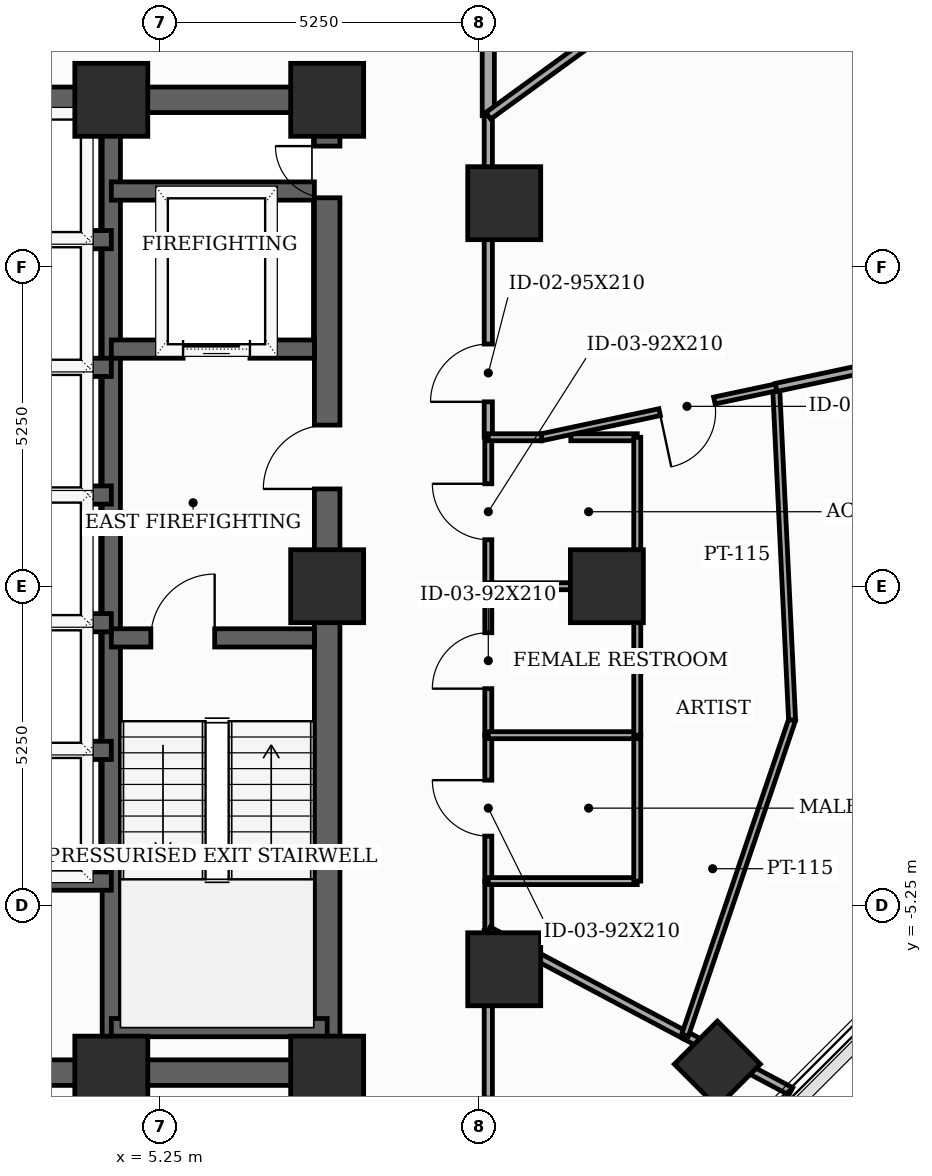
"""IFC4 building model, lengths in metres.
Left out: names, types, materials, properties, quantities, classifications, styles, units other than length and angle.
Written with IfcOpenShell. Run it as: python <this file> out.ifc"""

import sys

from ifc_helpers import new_model, si_unit, direction, frame, frame_2d, origin, origin_2d, place, context, subcontext, project, spatial, rectangle, extrude, element, fill, save


model = new_model("IFC4")
c1 = context("Model", 3, precision=1e-05, world=origin(), true_north=direction((0.0, 1.0)))
c2 = subcontext(c1, "Body", "Model", "MODEL_VIEW")
j1 = project(units=[si_unit("LENGTHUNIT", "METRE"), si_unit("PLANEANGLEUNIT", "RADIAN")], contexts=[c1])
p1 = place(None, origin())
s1 = spatial("IfcSite", under=j1, at=p1, CompositionType="ELEMENT")
p2 = place(p1, origin())
s2 = spatial("IfcBuilding", under=s1, at=p2, CompositionType="ELEMENT")
p3 = place(p2, frame((0.0, 0.0, 187.9)))
s3 = spatial("IfcBuildingStorey", under=s2, at=p3, CompositionType="ELEMENT", Elevation=187.9)
for number, where, z_axis, x_axis in (
    (1, (4.45, -8.0, 0.0), (0.0, 0.0, 1.0), (1.0, 0.0, 0.0)),
    (2, (8.0, -8.0, 0.0), (0.0, 0.0, 1.0), (1.0, 0.0, 0.0)),
    (3, (8.0, 0.0, 0.0), (0.0, 0.0, 1.0), (1.0, 0.0, 0.0)),
    (4, (8.0, 8.0, 0.0), (0.0, 0.0, 1.0), (1.0, 0.0, 0.0)),
    (5, (4.45, 8.0, 0.0), (0.0, 0.0, 1.0), (1.0, 0.0, 0.0)),
    (6, (12.6, 0.0, 0.0), (0.0, 0.0, 1.0), (1.0, 0.0, 0.0)),
    (7, (10.912, 6.3, 0.0), (0.0, 0.0, 1.0), (1.0, 0.0, 0.0)),
    (8, (10.912, -6.3, 0.0), (0.0, 0.0, 1.0), (1.0, 0.0, 0.0)),
):
    element("IfcColumn", number, at=place(p3, frame(where, z_axis=z_axis, x_axis=x_axis)), inside=s3, PredefinedType="COLUMN", context=c2, shape_type="SweptSolid", body=[
        extrude(rectangle(XDim=1.2, YDim=1.2, at=origin_2d()), origin(), (0.0, 0.0, 1.0), 3.7),
    ])
p4 = place(p3, frame((14.417, -7.861, 0.0), z_axis=(0.0, 0.0, 1.0), x_axis=(0.707106781187, 0.707106781187, 0.0)))
e9 = element("IfcColumn", 9, at=p4, inside=s3, PredefinedType="COLUMN", context=c2, shape_type="SweptSolid", body=[
    extrude(rectangle(XDim=1.0, YDim=1.0, at=origin_2d()), origin(), (0.0, 0.0, 1.0), 3.7),
])
p5 = place(p3, frame((8.0, -8.0, 0.0), z_axis=(0.0, 0.0, 1.0), x_axis=(0.0, 1.0, 0.0)))
e10 = element("IfcWall", 10, at=p5, inside=s3, PredefinedType="SHEAR", context=c2, shape_type="SweptSolid", body=[
    extrude(rectangle(XDim=16.0, YDim=0.42, at=frame_2d((8.0, 0.0))), origin(), (0.0, 0.0, 1.0), 3.5),
])
p6 = place(p5, frame((9.6, 0.0, 0.0)))
e11 = element("IfcOpeningElement", 11, at=p6, cuts=e10, PredefinedType="OPENING", context=c2, shape_type="SweptSolid", body=[
    extrude(rectangle(XDim=1.05, YDim=2.15, at=frame_2d((0.525, 1.075))), frame((0.0, 0.22, 0.0), z_axis=(0.0, -1.0, 0.0), x_axis=(1.0, 0.0, 0.0)), (0.0, 0.0, 1.0), 0.44),
])
p7 = place(p5, frame((14.389, 0.0, 0.0)))
e12 = element("IfcOpeningElement", 12, at=p7, cuts=e10, PredefinedType="OPENING", context=c2, shape_type="SweptSolid", body=[
    extrude(rectangle(XDim=0.85, YDim=2.02, at=frame_2d((0.425, 1.01))), frame((0.0, 0.22, 0.0), z_axis=(0.0, -1.0, 0.0), x_axis=(1.0, 0.0, 0.0)), (0.0, 0.0, 1.0), 0.44),
])
p8 = place(p3, frame((-8.0, -8.0, 0.0), z_axis=(0.0, 0.0, 1.0), x_axis=(1.0, 0.0, 0.0)))
e13 = element("IfcWall", 13, at=p8, inside=s3, PredefinedType="SHEAR", context=c2, shape_type="SweptSolid", body=[
    extrude(rectangle(XDim=16.0, YDim=0.42, at=frame_2d((8.0, 0.0))), origin(), (0.0, 0.0, 1.0), 3.5),
])
p9 = place(p8, frame((7.52, 0.0, 0.0)))
e14 = element("IfcOpeningElement", 14, at=p9, cuts=e13, PredefinedType="OPENING", context=c2, shape_type="SweptSolid", body=[
    extrude(rectangle(XDim=0.95, YDim=2.1, at=frame_2d((0.475, 1.05))), frame((0.0, 0.22, 0.0), z_axis=(0.0, -1.0, 0.0), x_axis=(1.0, 0.0, 0.0)), (0.0, 0.0, 1.0), 0.44),
])
p10 = place(p3, frame((-8.0, 8.0, 0.0), z_axis=(0.0, 0.0, 1.0), x_axis=(1.0, 0.0, 0.0)))
e15 = element("IfcWall", 15, at=p10, inside=s3, PredefinedType="SHEAR", context=c2, shape_type="SweptSolid", body=[
    extrude(rectangle(XDim=16.0, YDim=0.42, at=frame_2d((8.0, 0.0))), origin(), (0.0, 0.0, 1.0), 3.5),
])
p11 = place(p10, frame((7.1, 0.0, 0.0)))
e16 = element("IfcOpeningElement", 16, at=p11, cuts=e15, PredefinedType="OPENING", context=c2, shape_type="SweptSolid", body=[
    extrude(rectangle(XDim=1.8, YDim=2.15, at=frame_2d((0.9, 1.075))), frame((0.0, 0.22, 0.0), z_axis=(0.0, -1.0, 0.0), x_axis=(1.0, 0.0, 0.0)), (0.0, 0.0, 1.0), 0.44),
])
p12 = place(p3, frame((4.45, -7.79, 0.0), z_axis=(0.0, 0.0, 1.0), x_axis=(0.0, 1.0, 0.0)))
e17 = element("IfcWall", 17, at=p12, inside=s3, PredefinedType="SHEAR", context=c2, shape_type="SweptSolid", body=[
    extrude(rectangle(XDim=15.58, YDim=0.3, at=frame_2d((7.79, 0.0))), origin(), (0.0, 0.0, 1.0), 3.5),
])
p13 = place(p3, frame((4.45, -0.85, 0.0), z_axis=(0.0, 0.0, 1.0), x_axis=(1.0, 0.0, 0.0)))
e18 = element("IfcWall", 18, at=p13, inside=s3, PredefinedType="SHEAR", context=c2, shape_type="SweptSolid", body=[
    extrude(rectangle(XDim=3.34, YDim=0.3, at=frame_2d((1.67, 0.0))), origin(), (0.0, 0.0, 1.0), 3.5),
])
p14 = place(p13, frame((0.65, 0.0, 0.0)))
e19 = element("IfcOpeningElement", 19, at=p14, cuts=e18, PredefinedType="OPENING", context=c2, shape_type="SweptSolid", body=[
    extrude(rectangle(XDim=1.05, YDim=2.15, at=frame_2d((0.525, 1.075))), frame((0.0, 0.16, 0.0), z_axis=(0.0, -1.0, 0.0), x_axis=(1.0, 0.0, 0.0)), (0.0, 0.0, 1.0), 0.32),
])
p15 = place(p3, frame((4.45, -7.26, 0.0), z_axis=(0.0, 0.0, 1.0), x_axis=(1.0, 0.0, 0.0)))
e20 = element("IfcWall", 20, at=p15, inside=s3, PredefinedType="SHEAR", context=c2, shape_type="SweptSolid", body=[
    extrude(rectangle(XDim=3.55, YDim=0.3, at=frame_2d((1.775, 0.0))), origin(), (0.0, 0.0, 1.0), 3.5),
])
p16 = place(p3, frame((4.45, 3.9, 0.0), z_axis=(0.0, 0.0, 1.0), x_axis=(1.0, 0.0, 0.0)))
e21 = element("IfcWall", 21, at=p16, inside=s3, PredefinedType="SHEAR", context=c2, shape_type="SweptSolid", body=[
    extrude(rectangle(XDim=3.34, YDim=0.3, at=frame_2d((1.67, 0.0))), origin(), (0.0, 0.0, 1.0), 3.5),
])
p17 = place(p16, frame((1.18, 0.0, 0.0)))
e22 = element("IfcOpeningElement", 22, at=p17, cuts=e21, PredefinedType="OPENING", context=c2, shape_type="SweptSolid", body=[
    extrude(rectangle(XDim=1.1, YDim=2.1, at=frame_2d((0.55, 1.05))), frame((0.0, 0.16, 0.0), z_axis=(0.0, -1.0, 0.0), x_axis=(1.0, 0.0, 0.0)), (0.0, 0.0, 1.0), 0.32),
])
p18 = place(p3, frame((4.45, 6.5, 0.0), z_axis=(0.0, 0.0, 1.0), x_axis=(1.0, 0.0, 0.0)))
e23 = element("IfcWall", 23, at=p18, inside=s3, PredefinedType="SHEAR", context=c2, shape_type="SweptSolid", body=[
    extrude(rectangle(XDim=3.34, YDim=0.3, at=frame_2d((1.67, 0.0))), origin(), (0.0, 0.0, 1.0), 3.5),
])
p19 = place(p3, frame((-4.45, -4.85, 0.0), z_axis=(0.0, 0.0, 1.0), x_axis=(1.0, 0.0, 0.0)))
e24 = element("IfcWall", 24, at=p19, inside=s3, PredefinedType="SHEAR", context=c2, shape_type="SweptSolid", body=[
    extrude(rectangle(XDim=8.9, YDim=0.3, at=frame_2d((4.45, 0.0))), origin(), (0.0, 0.0, 1.0), 3.5),
])
for number, where, z_axis, x_axis in (
    (25, (1.68, 1.5, 0.0), (0.0, 0.0, 1.0), (1.0, 0.0, 0.0)),
    (26, (1.68, 3.6, 0.0), (0.0, 0.0, 1.0), (1.0, 0.0, 0.0)),
    (27, (1.68, 5.7, 0.0), (0.0, 0.0, 1.0), (1.0, 0.0, 0.0)),
    (28, (1.68, -2.7, 0.0), (0.0, 0.0, 1.0), (1.0, 0.0, 0.0)),
    (29, (1.68, -0.6, 0.0), (0.0, 0.0, 1.0), (1.0, 0.0, 0.0)),
):
    element("IfcWall", number, at=place(p3, frame(where, z_axis=z_axis, x_axis=x_axis)), inside=s3, PredefinedType="SHEAR", context=c2, shape_type="SweptSolid", body=[
        extrude(rectangle(XDim=2.77, YDim=0.3, at=frame_2d((1.385, 0.0))), origin(), (0.0, 0.0, 1.0), 3.5),
    ])
p20 = place(p3, frame((10.65, -10.15, 0.0), z_axis=(0.0, 0.0, 1.0), x_axis=(0.0, 1.0, 0.0)))
e30 = element("IfcWall", 30, at=p20, inside=s3, PredefinedType="PARTITIONING", context=c2, shape_type="SweptSolid", body=[
    extrude(rectangle(XDim=4.487, YDim=0.135, at=frame_2d((2.243, 0.0))), origin(), (0.0, 0.0, 1.0), 2.885),
])
p21 = place(p20, frame((0.781, 0.0, 0.0)))
e31 = element("IfcOpeningElement", 31, at=p21, cuts=e30, PredefinedType="OPENING", context=c2, shape_type="SweptSolid", body=[
    extrude(rectangle(XDim=0.95, YDim=2.1, at=frame_2d((0.475, 1.05))), frame((0.0, 0.077, 0.0), z_axis=(0.0, -1.0, 0.0), x_axis=(1.0, 0.0, 0.0)), (0.0, 0.0, 1.0), 0.155),
])
p22 = place(p3, frame((10.65, -4.85, 0.0), z_axis=(0.0, 0.0, 1.0), x_axis=(0.0, 1.0, 0.0)))
e32 = element("IfcWall", 32, at=p22, inside=s3, PredefinedType="PARTITIONING", context=c2, shape_type="SweptSolid", body=[
    extrude(rectangle(XDim=2.4, YDim=0.115, at=frame_2d((1.2, 0.0))), origin(), (0.0, 0.0, 1.0), 3.5),
])
p23 = place(p22, frame((0.74, 0.0, 0.0)))
e33 = element("IfcOpeningElement", 33, at=p23, cuts=e32, PredefinedType="OPENING", context=c2, shape_type="SweptSolid", body=[
    extrude(rectangle(XDim=0.92, YDim=2.1, at=frame_2d((0.46, 1.05))), frame((0.0, 0.067, 0.0), z_axis=(0.0, -1.0, 0.0), x_axis=(1.0, 0.0, 0.0)), (0.0, 0.0, 1.0), 0.135),
])
p24 = place(p3, frame((10.65, -5.663, 0.0), z_axis=(0.0, 0.0, 1.0), x_axis=(0.0, 1.0, 0.0)))
e34 = element("IfcWall", 34, at=p24, inside=s3, PredefinedType="PARTITIONING", context=c2, shape_type="SweptSolid", body=[
    extrude(rectangle(XDim=0.813, YDim=0.115, at=frame_2d((0.406, 0.0))), origin(), (0.0, 0.0, 1.0), 3.5),
])
p25 = place(p3, frame((10.65, -2.45, 0.0), z_axis=(0.0, 0.0, 1.0), x_axis=(0.0, 1.0, 0.0)))
e35 = element("IfcWall", 35, at=p25, inside=s3, PredefinedType="PARTITIONING", context=c2, shape_type="SweptSolid", body=[
    extrude(rectangle(XDim=2.45, YDim=0.115, at=frame_2d((1.225, 0.0))), origin(), (0.0, 0.0, 1.0), 2.885),
])
p26 = place(p25, frame((0.765, 0.0, 0.0)))
e36 = element("IfcOpeningElement", 36, at=p26, cuts=e35, PredefinedType="OPENING", context=c2, shape_type="SweptSolid", body=[
    extrude(rectangle(XDim=0.92, YDim=2.1, at=frame_2d((0.46, 1.05))), frame((0.0, 0.067, 0.0), z_axis=(0.0, -1.0, 0.0), x_axis=(1.0, 0.0, 0.0)), (0.0, 0.0, 1.0), 0.135),
])
p27 = place(p3, frame((10.65, 0.0, 0.0), z_axis=(0.0, 0.0, 1.0), x_axis=(0.0, 1.0, 0.0)))
e37 = element("IfcWall", 37, at=p27, inside=s3, PredefinedType="PARTITIONING", context=c2, shape_type="SweptSolid", body=[
    extrude(rectangle(XDim=2.45, YDim=0.115, at=frame_2d((1.225, 0.0))), origin(), (0.0, 0.0, 1.0), 2.885),
])
p28 = place(p27, frame((0.765, 0.0, 0.0)))
e38 = element("IfcOpeningElement", 38, at=p28, cuts=e37, PredefinedType="OPENING", context=c2, shape_type="SweptSolid", body=[
    extrude(rectangle(XDim=0.92, YDim=2.1, at=frame_2d((0.46, 1.05))), frame((0.0, 0.067, 0.0), z_axis=(0.0, -1.0, 0.0), x_axis=(1.0, 0.0, 0.0)), (0.0, 0.0, 1.0), 0.135),
])
p29 = place(p3, frame((10.65, 2.45, 0.0), z_axis=(0.0, 0.0, 1.0), x_axis=(0.0, 1.0, 0.0)))
e39 = element("IfcWall", 39, at=p29, inside=s3, PredefinedType="PARTITIONING", context=c2, shape_type="SweptSolid", body=[
    extrude(rectangle(XDim=5.288, YDim=0.135, at=frame_2d((2.644, 0.0))), origin(), (0.0, 0.0, 1.0), 2.885),
])
p30 = place(p29, frame((0.583, 0.0, 0.0)))
e40 = element("IfcOpeningElement", 40, at=p30, cuts=e39, PredefinedType="OPENING", context=c2, shape_type="SweptSolid", body=[
    extrude(rectangle(XDim=0.95, YDim=2.1, at=frame_2d((0.475, 1.05))), frame((0.0, 0.077, 0.0), z_axis=(0.0, -1.0, 0.0), x_axis=(1.0, 0.0, 0.0)), (0.0, 0.0, 1.0), 0.155),
])
p31 = place(p3, frame((10.65, 7.738, 0.0), z_axis=(0.0, 0.0, 1.0), x_axis=(0.0, 1.0, 0.0)))
e41 = element("IfcWall", 41, at=p31, inside=s3, PredefinedType="SOLIDWALL", context=c2, shape_type="SweptSolid", body=[
    extrude(rectangle(XDim=2.412, YDim=0.2, at=frame_2d((1.206, 0.0))), origin(), (0.0, 0.0, 1.0), 3.5),
])
p32 = place(p3, frame((13.886, -7.383, 0.0), z_axis=(0.0, 0.0, 1.0), x_axis=(-0.88302513666, 0.469325695041, 0.0)))
e42 = element("IfcWall", 42, at=p32, inside=s3, PredefinedType="PARTITIONING", context=c2, shape_type="SweptSolid", body=[
    extrude(rectangle(XDim=3.665, YDim=0.135, at=frame_2d((1.833, 0.0))), origin(), (0.0, 0.0, 1.0), 2.885),
])
p33 = place(p3, frame((15.625, -8.308, 0.0), z_axis=(0.0, 0.0, 1.0), x_axis=(-0.882966413063, 0.469436165418, 0.0)))
e43 = element("IfcWall", 43, at=p33, inside=s3, PredefinedType="PARTITIONING", context=c2, shape_type="SweptSolid", body=[
    extrude(rectangle(XDim=1.969, YDim=0.135, at=frame_2d((0.985, 0.0))), origin(), (0.0, 0.0, 1.0), 2.985),
])
p34 = place(p3, frame((10.65, -4.85, 0.0), z_axis=(0.0, 0.0, 1.0), x_axis=(1.0, 0.0, 0.0)))
e44 = element("IfcWall", 44, at=p34, inside=s3, PredefinedType="PARTITIONING", context=c2, shape_type="SweptSolid", body=[
    extrude(rectangle(XDim=2.45, YDim=0.115, at=frame_2d((1.225, 0.0))), origin(), (0.0, 0.0, 1.0), 2.885),
])
p35 = place(p3, frame((13.1, -4.85, 0.0), z_axis=(0.0, 0.0, 1.0), x_axis=(0.0, 1.0, 0.0)))
e45 = element("IfcWall", 45, at=p35, inside=s3, PredefinedType="PARTITIONING", context=c2, shape_type="SweptSolid", body=[
    extrude(rectangle(XDim=2.4, YDim=0.115, at=frame_2d((1.2, 0.0))), origin(), (0.0, 0.0, 1.0), 3.5),
])
p36 = place(p3, frame((13.1, -2.45, 0.0), z_axis=(0.0, 0.0, 1.0), x_axis=(-1.0, 0.0, 0.0)))
e46 = element("IfcWall", 46, at=p36, inside=s3, PredefinedType="PARTITIONING", context=c2, shape_type="SweptSolid", body=[
    extrude(rectangle(XDim=2.45, YDim=0.115, at=frame_2d((1.225, 0.0))), origin(), (0.0, 0.0, 1.0), 2.885),
])
p37 = place(p3, frame((13.1, 0.0, 0.0), z_axis=(0.0, 0.0, 1.0), x_axis=(0.0, -1.0, 0.0)))
e47 = element("IfcWall", 47, at=p37, inside=s3, PredefinedType="PARTITIONING", context=c2, shape_type="SweptSolid", body=[
    extrude(rectangle(XDim=2.45, YDim=0.115, at=frame_2d((1.225, 0.0))), origin(), (0.0, 0.0, 1.0), 2.985),
])
p38 = place(p3, frame((13.886, -7.383, 0.0), z_axis=(0.0, 0.0, 1.0), x_axis=(0.321480582018, 0.946916171255, 0.0)))
e48 = element("IfcWall", 48, at=p38, inside=s3, PredefinedType="PARTITIONING", context=c2, shape_type="SweptSolid", body=[
    extrude(rectangle(XDim=5.475, YDim=0.115, at=frame_2d((2.737, 0.0))), origin(), (0.0, 0.0, 1.0), 3.5),
])
p39 = place(p3, frame((15.646, -2.199, 0.0), z_axis=(0.0, 0.0, 1.0), x_axis=(-0.047844791808, 0.998854782187, 0.0)))
e49 = element("IfcWall", 49, at=p39, inside=s3, PredefinedType="PARTITIONING", context=c2, shape_type="SweptSolid", body=[
    extrude(rectangle(XDim=5.475, YDim=0.115, at=frame_2d((2.738, 0.0))), origin(), (0.0, 0.0, 1.0), 2.985),
])
p40 = place(p3, frame((12.007, 2.45, 0.0), z_axis=(0.0, 0.0, 1.0), x_axis=(1.0, 0.0, 0.0)))
e50 = element("IfcWall", 50, at=p40, inside=s3, PredefinedType="PARTITIONING", context=c2, shape_type="SweptSolid", body=[
    extrude(rectangle(XDim=1.093, YDim=0.115, at=frame_2d((0.546, 0.0))), origin(), (0.0, 0.0, 1.0), 2.885),
])
p41 = place(p3, frame((13.1, 2.45, 0.0), z_axis=(0.0, 0.0, 1.0), x_axis=(0.0, -1.0, 0.0)))
e51 = element("IfcWall", 51, at=p41, inside=s3, PredefinedType="PARTITIONING", context=c2, shape_type="SweptSolid", body=[
    extrude(rectangle(XDim=2.45, YDim=0.115, at=frame_2d((1.225, 0.0))), origin(), (0.0, 0.0, 1.0), 2.985),
])
p42 = place(p3, frame((15.384, 3.27, 0.0), z_axis=(0.0, 0.0, 1.0), x_axis=(-0.978147995284, -0.207909834598, 0.0)))
e52 = element("IfcWall", 52, at=p42, inside=s3, PredefinedType="PARTITIONING", context=c2, shape_type="SweptSolid", body=[
    extrude(rectangle(XDim=3.944, YDim=0.115, at=frame_2d((1.972, 0.0))), origin(), (0.0, 0.0, 1.0), 2.885),
])
p43 = place(p42, frame((1.039, 0.0, 0.0)))
e53 = element("IfcOpeningElement", 53, at=p43, cuts=e52, PredefinedType="OPENING", context=c2, shape_type="SweptSolid", body=[
    extrude(rectangle(XDim=0.92, YDim=2.1, at=frame_2d((0.46, 1.05))), frame((0.0, 0.067, 0.0), z_axis=(0.0, -1.0, 0.0), x_axis=(1.0, 0.0, 0.0)), (0.0, 0.0, 1.0), 0.135),
])
p44 = place(p3, frame((13.1, 0.0, 0.0), z_axis=(0.0, 0.0, 1.0), x_axis=(-1.0, 0.0, 0.0)))
e54 = element("IfcWall", 54, at=p44, inside=s3, PredefinedType="PARTITIONING", context=c2, shape_type="SweptSolid", body=[
    extrude(rectangle(XDim=2.45, YDim=0.115, at=frame_2d((1.225, 0.0))), origin(), (0.0, 0.0, 1.0), 2.885),
])
p45 = place(p3, frame((29.271, 6.221, 0.0), z_axis=(0.0, 0.0, 1.0), x_axis=(-0.978151114267, -0.207895160259, 0.0)))
e55 = element("IfcWall", 55, at=p45, inside=s3, PredefinedType="PARTITIONING", context=c2, shape_type="SweptSolid", body=[
    extrude(rectangle(XDim=14.197, YDim=0.135, at=frame_2d((7.098, 0.0))), origin(), (0.0, 0.0, 1.0), 2.985),
])
p46 = place(p45, frame((6.638, 0.0, 0.0)))
e56 = element("IfcOpeningElement", 56, at=p46, cuts=e55, PredefinedType="OPENING", context=c2, shape_type="SweptSolid", body=[
    extrude(rectangle(XDim=0.92, YDim=2.1, at=frame_2d((0.46, 1.05))), frame((0.0, 0.077, 0.0), z_axis=(0.0, -1.0, 0.0), x_axis=(1.0, 0.0, 0.0)), (0.0, 0.0, 1.0), 0.155),
])
p47 = place(p3, frame((11.526, 2.45, 0.0), z_axis=(0.0, 0.0, 1.0), x_axis=(-1.0, 0.0, 0.0)))
e57 = element("IfcWall", 57, at=p47, inside=s3, PredefinedType="PARTITIONING", context=c2, shape_type="SweptSolid", body=[
    extrude(rectangle(XDim=0.876, YDim=0.115, at=frame_2d((0.438, 0.0))), origin(), (0.0, 0.0, 1.0), 3.5),
])
p48 = place(p3, frame((12.738, 9.255, 0.0), z_axis=(0.0, 0.0, 1.0), x_axis=(-0.809067292609, -0.587716016483, 0.0)))
e58 = element("IfcWall", 58, at=p48, inside=s3, PredefinedType="PARTITIONING", context=c2, shape_type="SweptSolid", body=[
    extrude(rectangle(XDim=2.581, YDim=0.135, at=frame_2d((1.291, 0.0))), origin(), (0.0, 0.0, 1.0), 3.5),
])
p49 = place(p6, origin())
e59 = element("IfcDoor", 59, at=p49, inside=s3, OperationType="SINGLE_SWING_LEFT", PredefinedType="DOOR", context=c2, shape_type="SweptSolid", body=[
    extrude(rectangle(XDim=1.05, YDim=2.15, at=frame_2d((0.525, 1.075))), frame((0.0, 0.025, 0.0), z_axis=(0.0, -1.0, 0.0), x_axis=(1.0, 0.0, 0.0)), (0.0, 0.0, 1.0), 0.05),
])
fill(e11, e59)
p50 = place(p7, origin())
e60 = element("IfcDoor", 60, at=p50, inside=s3, OperationType="SINGLE_SWING_RIGHT", PredefinedType="TRAPDOOR", context=c2, shape_type="SweptSolid", body=[
    extrude(rectangle(XDim=0.85, YDim=2.02, at=frame_2d((0.425, 1.01))), frame((0.0, 0.025, 0.0), z_axis=(0.0, -1.0, 0.0), x_axis=(1.0, 0.0, 0.0)), (0.0, 0.0, 1.0), 0.05),
])
fill(e12, e60)
p51 = place(p14, origin())
e61 = element("IfcDoor", 61, at=p51, inside=s3, OperationType="SINGLE_SWING_RIGHT", PredefinedType="DOOR", context=c2, shape_type="SweptSolid", body=[
    extrude(rectangle(XDim=1.05, YDim=2.15, at=frame_2d((0.525, 1.075))), frame((0.0, 0.025, 0.0), z_axis=(0.0, -1.0, 0.0), x_axis=(1.0, 0.0, 0.0)), (0.0, 0.0, 1.0), 0.05),
])
fill(e19, e61)
p52 = place(p17, origin())
e62 = element("IfcDoor", 62, at=p52, inside=s3, OperationType="SLIDING_TO_LEFT", PredefinedType="DOOR", context=c2, shape_type="SweptSolid", body=[
    extrude(rectangle(XDim=1.1, YDim=2.1, at=frame_2d((0.55, 1.05))), frame((0.0, 0.025, 0.0), z_axis=(0.0, -1.0, 0.0), x_axis=(1.0, 0.0, 0.0)), (0.0, 0.0, 1.0), 0.05),
])
fill(e22, e62)
p53 = place(p23, origin())
e63 = element("IfcDoor", 63, at=p53, inside=s3, OperationType="SINGLE_SWING_RIGHT", PredefinedType="DOOR", context=c2, shape_type="SweptSolid", body=[
    extrude(rectangle(XDim=0.92, YDim=2.1, at=frame_2d((0.46, 1.05))), frame((0.0, 0.025, 0.0), z_axis=(0.0, -1.0, 0.0), x_axis=(1.0, 0.0, 0.0)), (0.0, 0.0, 1.0), 0.05),
])
fill(e33, e63)
p54 = place(p26, origin())
e64 = element("IfcDoor", 64, at=p54, inside=s3, OperationType="SINGLE_SWING_LEFT", PredefinedType="DOOR", context=c2, shape_type="SweptSolid", body=[
    extrude(rectangle(XDim=0.92, YDim=2.1, at=frame_2d((0.46, 1.05))), frame((0.0, 0.025, 0.0), z_axis=(0.0, -1.0, 0.0), x_axis=(1.0, 0.0, 0.0)), (0.0, 0.0, 1.0), 0.05),
])
fill(e36, e64)
p55 = place(p28, origin())
e65 = element("IfcDoor", 65, at=p55, inside=s3, OperationType="SINGLE_SWING_RIGHT", PredefinedType="DOOR", context=c2, shape_type="SweptSolid", body=[
    extrude(rectangle(XDim=0.92, YDim=2.1, at=frame_2d((0.46, 1.05))), frame((0.0, 0.025, 0.0), z_axis=(0.0, -1.0, 0.0), x_axis=(1.0, 0.0, 0.0)), (0.0, 0.0, 1.0), 0.05),
])
fill(e38, e65)
p56 = place(p30, origin())
e66 = element("IfcDoor", 66, at=p56, inside=s3, OperationType="SINGLE_SWING_LEFT", PredefinedType="DOOR", context=c2, shape_type="SweptSolid", body=[
    extrude(rectangle(XDim=0.95, YDim=2.1, at=frame_2d((0.475, 1.05))), frame((0.0, 0.025, 0.0), z_axis=(0.0, -1.0, 0.0), x_axis=(1.0, 0.0, 0.0)), (0.0, 0.0, 1.0), 0.05),
])
fill(e40, e66)
p57 = place(p43, origin())
e67 = element("IfcDoor", 67, at=p57, inside=s3, OperationType="SINGLE_SWING_RIGHT", PredefinedType="DOOR", context=c2, shape_type="SweptSolid", body=[
    extrude(rectangle(XDim=0.92, YDim=2.1, at=frame_2d((0.46, 1.05))), frame((0.0, 0.025, 0.0), z_axis=(0.0, -1.0, 0.0), x_axis=(1.0, 0.0, 0.0)), (0.0, 0.0, 1.0), 0.05),
])
fill(e53, e67)
save(model, sys.argv[1])
